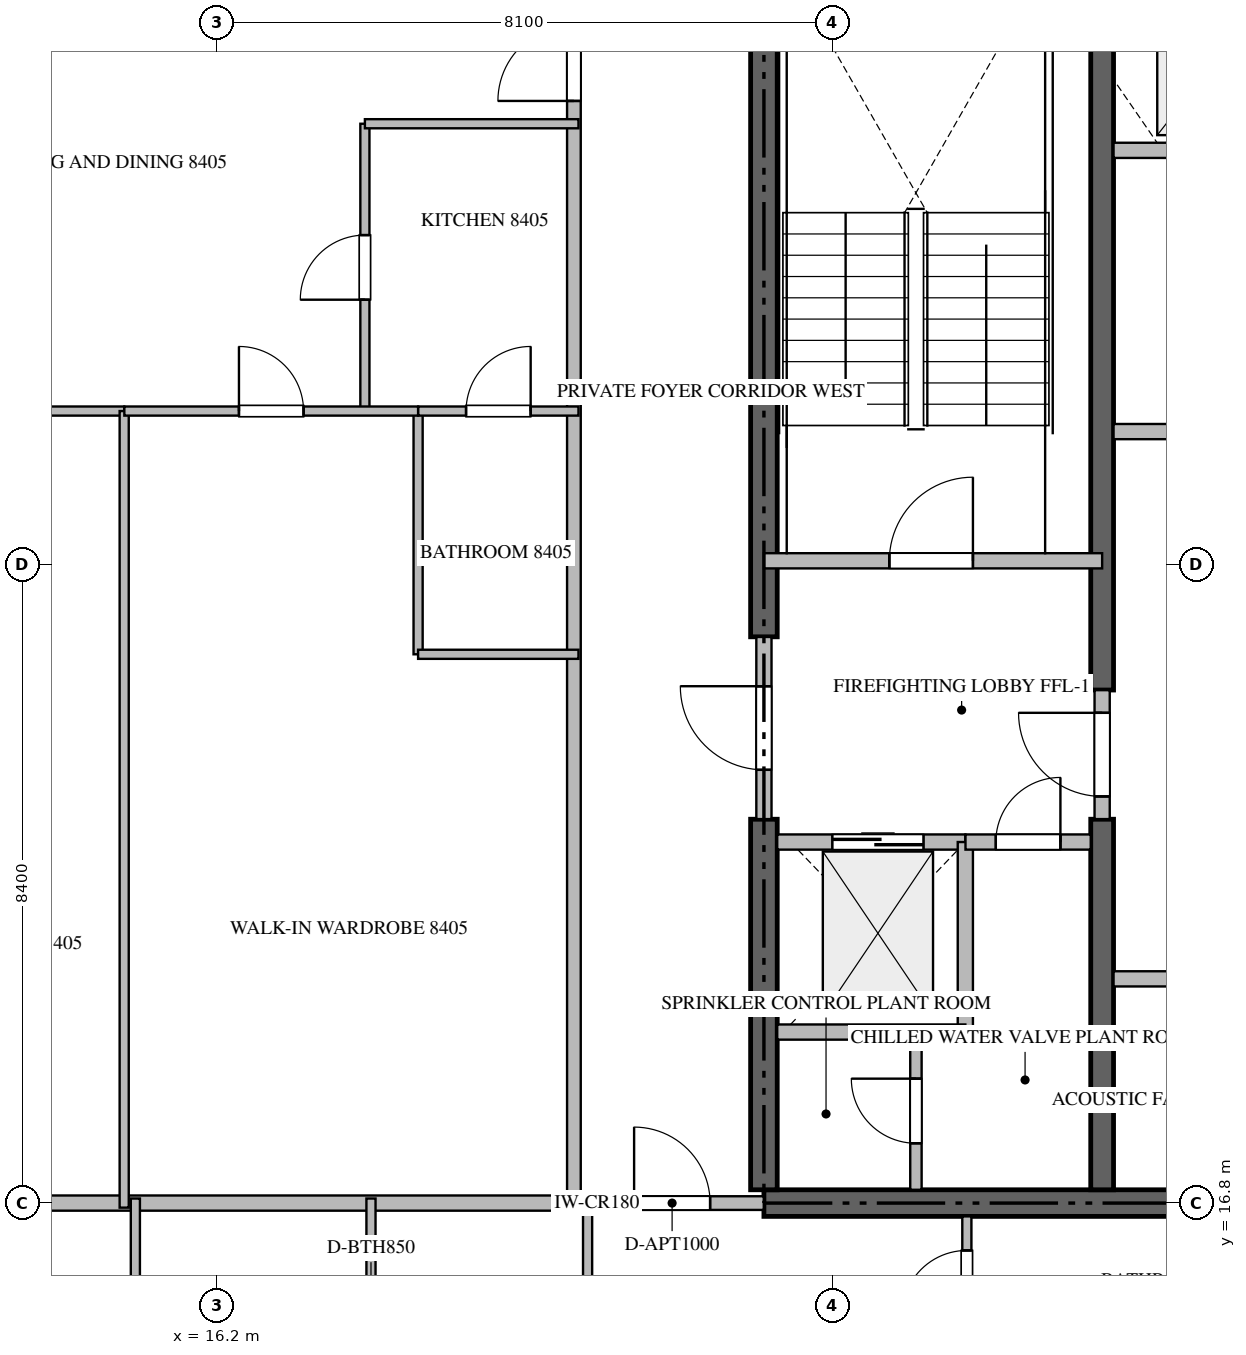
"""IFC4 building model, lengths in metres.
Left out: names, types, materials, properties, quantities, classifications, styles, units other than length and angle.
Written with IfcOpenShell. Run it as: python <this file> out.ifc"""

import sys

from ifc_helpers import new_model, si_unit, direction, frame, frame_2d, origin, place, context, subcontext, project, spatial, rectangle, extrude, source, transform, mapped, element, fill, save


model = new_model("IFC4")
c1 = context("Model", 3, precision=1e-05, world=origin(), true_north=direction((0.0, 1.0)))
c2 = subcontext(c1, "Body", "Model", "MODEL_VIEW")
j1 = project(units=[si_unit("LENGTHUNIT", "METRE"), si_unit("PLANEANGLEUNIT", "RADIAN")], contexts=[c1])
p1 = place(None, origin())
s1 = spatial("IfcSite", under=j1, at=p1, CompositionType="ELEMENT")
p2 = place(p1, origin())
s2 = spatial("IfcBuilding", under=s1, at=p2, CompositionType="ELEMENT")
p3 = place(p2, frame((0.0, 0.0, 338.0)))
s3 = spatial("IfcBuildingStorey", under=s2, at=p3, CompositionType="ELEMENT", Elevation=338.0)
p4 = place(p3, frame((23.4, 16.8, -0.44), z_axis=(0.0, 0.0, 1.0), x_axis=(1.0, 0.0, 0.0)))
e1 = element("IfcWall", 1, at=p4, inside=s3, PredefinedType="SHEAR", context=c2, shape_type="SweptSolid", body=[
    extrude(rectangle(XDim=18.0, YDim=0.35, at=frame_2d((9.0, 0.0))), origin(), (0.0, 0.0, 1.0), 4.228),
])
p5 = place(p3, frame((23.4, 16.975, -0.44), z_axis=(0.0, 0.0, 1.0), x_axis=(0.0, 1.0, 0.0)))
e2 = element("IfcWall", 2, at=p5, inside=s3, PredefinedType="SHEAR", context=c2, shape_type="SweptSolid", body=[
    extrude(rectangle(XDim=4.875, YDim=0.35, at=frame_2d((2.438, 0.0))), origin(), (0.0, 0.0, 1.0), 4.228),
])
p6 = place(p3, frame((23.4, 24.25, -0.44), z_axis=(0.0, 0.0, 1.0), x_axis=(0.0, 1.0, 0.0)))
e3 = element("IfcWall", 3, at=p6, inside=s3, PredefinedType="SHEAR", context=c2, shape_type="SweptSolid", body=[
    extrude(rectangle(XDim=9.175, YDim=0.35, at=frame_2d((4.587, 0.0))), origin(), (0.0, 0.0, 1.0), 4.228),
])
p7 = place(p3, frame((27.85, 16.975, -0.44), z_axis=(0.0, 0.0, 1.0), x_axis=(0.0, 1.0, 0.0)))
e4 = element("IfcWall", 4, at=p7, inside=s3, PredefinedType="SHEAR", context=c2, shape_type="SweptSolid", body=[
    extrude(rectangle(XDim=4.875, YDim=0.3, at=frame_2d((2.438, 0.0))), origin(), (0.0, 0.0, 1.0), 4.228),
])
p8 = place(p3, frame((27.85, 23.55, -0.44), z_axis=(0.0, 0.0, 1.0), x_axis=(0.0, 1.0, 0.0)))
e5 = element("IfcWall", 5, at=p8, inside=s3, PredefinedType="SHEAR", context=c2, shape_type="SweptSolid", body=[
    extrude(rectangle(XDim=9.875, YDim=0.3, at=frame_2d((4.938, 0.0))), origin(), (0.0, 0.0, 1.0), 4.228),
])
p9 = place(p3, frame((23.4, 25.25, 0.0), z_axis=(0.0, 0.0, 1.0), x_axis=(1.0, 0.0, 0.0)))
e6 = element("IfcWall", 6, at=p9, inside=s3, PredefinedType="STANDARD", context=c2, shape_type="SweptSolid", body=[
    extrude(rectangle(XDim=4.45, YDim=0.2, at=frame_2d((2.225, 0.0))), origin(), (0.0, 0.0, 1.0), 3.79),
])
p10 = place(p9, frame((1.65, 0.0, 0.0)))
e7 = element("IfcOpeningElement", 7, at=p10, cuts=e6, PredefinedType="OPENING", context=c2, shape_type="SweptSolid", body=[
    extrude(rectangle(XDim=1.1, YDim=2.15, at=frame_2d((0.55, 1.075))), frame((0.0, 0.11, 0.0), z_axis=(0.0, -1.0, 0.0), x_axis=(1.0, 0.0, 0.0)), (0.0, 0.0, 1.0), 0.22),
])
p11 = place(p3, frame((23.575, 21.55, 0.0), z_axis=(0.0, 0.0, 1.0), x_axis=(1.0, 0.0, 0.0)))
e8 = element("IfcWall", 8, at=p11, inside=s3, PredefinedType="STANDARD", context=c2, shape_type="SweptSolid", body=[
    extrude(rectangle(XDim=2.475, YDim=0.2, at=frame_2d((1.238, 0.0))), origin(), (0.0, 0.0, 1.0), 3.79),
])
p12 = place(p11, frame((0.725, 0.0, 0.0)))
e9 = element("IfcOpeningElement", 9, at=p12, cuts=e8, PredefinedType="OPENING", context=c2, shape_type="SweptSolid", body=[
    extrude(rectangle(XDim=1.2, YDim=2.2, at=frame_2d((0.6, 1.1))), frame((0.0, 0.11, 0.0), z_axis=(0.0, -1.0, 0.0), x_axis=(1.0, 0.0, 0.0)), (0.0, 0.0, 1.0), 0.22),
])
p13 = place(p3, frame((28.0, 30.65, 0.0), z_axis=(0.0, 0.0, 1.0), x_axis=(1.0, 0.0, 0.0)))
e10 = element("IfcWall", 10, at=p13, inside=s3, PredefinedType="STANDARD", context=c2, shape_type="SweptSolid", body=[
    extrude(rectangle(XDim=2.55, YDim=0.2, at=frame_2d((1.275, 0.0))), origin(), (0.0, 0.0, 1.0), 3.79),
])
p14 = place(p13, frame((0.85, 0.0, 0.0)))
e11 = element("IfcOpeningElement", 11, at=p14, cuts=e10, PredefinedType="OPENING", context=c2, shape_type="SweptSolid", body=[
    extrude(rectangle(XDim=1.1, YDim=2.2, at=frame_2d((0.55, 1.1))), frame((0.0, 0.11, 0.0), z_axis=(0.0, -1.0, 0.0), x_axis=(1.0, 0.0, 0.0)), (0.0, 0.0, 1.0), 0.22),
])
p15 = place(p3, frame((26.05, 19.05, 0.0), z_axis=(0.0, 0.0, 1.0), x_axis=(0.0, 1.0, 0.0)))
e12 = element("IfcWall", 12, at=p15, inside=s3, PredefinedType="STANDARD", context=c2, shape_type="SweptSolid", body=[
    extrude(rectangle(XDim=2.5, YDim=0.2, at=frame_2d((1.25, 0.0))), origin(), (0.0, 0.0, 1.0), 3.79),
])
p16 = place(p3, frame((23.575, 19.05, 0.0), z_axis=(0.0, 0.0, 1.0), x_axis=(1.0, 0.0, 0.0)))
e13 = element("IfcWall", 13, at=p16, inside=s3, PredefinedType="STANDARD", context=c2, shape_type="SweptSolid", body=[
    extrude(rectangle(XDim=2.475, YDim=0.2, at=frame_2d((1.238, 0.0))), origin(), (0.0, 0.0, 1.0), 3.79),
])
p17 = place(p3, frame((26.052, 21.55, 0.0), z_axis=(0.0, 0.0, 1.0), x_axis=(1.0, 0.0, 0.0)))
e14 = element("IfcWall", 14, at=p17, inside=s3, PredefinedType="STANDARD", context=c2, shape_type="SweptSolid", body=[
    extrude(rectangle(XDim=1.648, YDim=0.2, at=frame_2d((0.824, 0.0))), origin(), (0.0, 0.0, 1.0), 3.79),
])
p18 = place(p17, frame((0.399, 0.0, 0.0)))
e15 = element("IfcOpeningElement", 15, at=p18, cuts=e14, PredefinedType="OPENING", context=c2, shape_type="SweptSolid", body=[
    extrude(rectangle(XDim=0.85, YDim=2.1, at=frame_2d((0.425, 1.05))), frame((0.0, 0.11, 0.0), z_axis=(0.0, -1.0, 0.0), x_axis=(1.0, 0.0, 0.0)), (0.0, 0.0, 1.0), 0.22),
])
p19 = place(p3, frame((23.4, 21.852, 0.0), z_axis=(0.0, 0.0, 1.0), x_axis=(0.0, 1.0, 0.0)))
e16 = element("IfcWall", 16, at=p19, inside=s3, PredefinedType="STANDARD", context=c2, shape_type="SweptSolid", body=[
    extrude(rectangle(XDim=2.396, YDim=0.2, at=frame_2d((1.198, 0.0))), origin(), (0.0, 0.0, 1.0), 3.79),
])
p20 = place(p19, frame((0.648, 0.0, 0.0)))
e17 = element("IfcOpeningElement", 17, at=p20, cuts=e16, PredefinedType="OPENING", context=c2, shape_type="SweptSolid", body=[
    extrude(rectangle(XDim=1.1, YDim=2.15, at=frame_2d((0.55, 1.075))), frame((0.0, 0.11, 0.0), z_axis=(0.0, -1.0, 0.0), x_axis=(1.0, 0.0, 0.0)), (0.0, 0.0, 1.0), 0.22),
])
p21 = place(p3, frame((27.85, 21.852, 0.0), z_axis=(0.0, 0.0, 1.0), x_axis=(0.0, 1.0, 0.0)))
e18 = element("IfcWall", 18, at=p21, inside=s3, PredefinedType="STANDARD", context=c2, shape_type="SweptSolid", body=[
    extrude(rectangle(XDim=1.696, YDim=0.2, at=frame_2d((0.848, 0.0))), origin(), (0.0, 0.0, 1.0), 3.79),
])
p22 = place(p21, frame((0.298, 0.0, 0.0)))
e19 = element("IfcOpeningElement", 19, at=p22, cuts=e18, PredefinedType="OPENING", context=c2, shape_type="SweptSolid", body=[
    extrude(rectangle(XDim=1.1, YDim=2.15, at=frame_2d((0.55, 1.075))), frame((0.0, 0.11, 0.0), z_axis=(0.0, -1.0, 0.0), x_axis=(1.0, 0.0, 0.0)), (0.0, 0.0, 1.0), 0.22),
])
p23 = place(p3, frame((25.4, 16.975, 0.0), z_axis=(0.0, 0.0, 1.0), x_axis=(0.0, 1.0, 0.0)))
e20 = element("IfcWall", 20, at=p23, inside=s3, PredefinedType="PARTITIONING", context=c2, shape_type="SweptSolid", body=[
    extrude(rectangle(XDim=2.075, YDim=0.15, at=frame_2d((1.038, 0.0))), origin(), (0.0, 0.0, 1.0), 3.79),
])
p24 = place(p23, frame((0.612, 0.0, 0.0)))
e21 = element("IfcOpeningElement", 21, at=p24, cuts=e20, PredefinedType="OPENING", context=c2, shape_type="SweptSolid", body=[
    extrude(rectangle(XDim=0.85, YDim=2.1, at=frame_2d((0.425, 1.05))), frame((0.0, 0.085, 0.0), z_axis=(0.0, -1.0, 0.0), x_axis=(1.0, 0.0, 0.0)), (0.0, 0.0, 1.0), 0.17),
])
p25 = place(p3, frame((28.0, 19.75, 0.0), z_axis=(0.0, 0.0, 1.0), x_axis=(1.0, 0.0, 0.0)))
e22 = element("IfcWall", 22, at=p25, inside=s3, PredefinedType="STANDARD", context=c2, shape_type="SweptSolid", body=[
    extrude(rectangle(XDim=4.4, YDim=0.2, at=frame_2d((2.2, 0.0))), origin(), (0.0, 0.0, 1.0), 3.79),
])
p26 = place(p25, frame((1.75, 0.0, 0.0)))
e23 = element("IfcOpeningElement", 23, at=p26, cuts=e22, PredefinedType="OPENING", context=c2, shape_type="SweptSolid", body=[
    extrude(rectangle(XDim=0.9, YDim=2.1, at=frame_2d((0.45, 1.05))), frame((0.0, 0.11, 0.0), z_axis=(0.0, -1.0, 0.0), x_axis=(1.0, 0.0, 0.0)), (0.0, 0.0, 1.0), 0.22),
])
p27 = place(p3, frame((28.0, 26.95, 0.0), z_axis=(0.0, 0.0, 1.0), x_axis=(1.0, 0.0, 0.0)))
e24 = element("IfcWall", 24, at=p27, inside=s3, PredefinedType="STANDARD", context=c2, shape_type="SweptSolid", body=[
    extrude(rectangle(XDim=6.95, YDim=0.2, at=frame_2d((3.475, 0.0))), origin(), (0.0, 0.0, 1.0), 3.79),
])
p28 = place(p3, frame((10.882, 16.8, 0.0), z_axis=(0.0, 0.0, 1.0), x_axis=(1.0, 0.0, 0.0)))
e25 = element("IfcWall", 25, at=p28, inside=s3, PredefinedType="PARTITIONING", context=c2, shape_type="SweptSolid", body=[
    extrude(rectangle(XDim=10.018, YDim=0.2, at=frame_2d((5.009, 0.0))), origin(), (0.0, 0.0, 1.0), 3.79),
])
p29 = place(p3, frame((20.902, 16.8, 0.0), z_axis=(0.0, 0.0, 1.0), x_axis=(1.0, 0.0, 0.0)))
e26 = element("IfcWall", 26, at=p29, inside=s3, PredefinedType="PARTITIONING", context=c2, shape_type="SweptSolid", body=[
    extrude(rectangle(XDim=2.496, YDim=0.18, at=frame_2d((1.248, 0.0))), origin(), (0.0, 0.0, 1.0), 3.79),
])
p30 = place(p29, frame((0.79, 0.0, 0.0)))
e27 = element("IfcOpeningElement", 27, at=p30, cuts=e26, PredefinedType="OPENING", context=c2, shape_type="SweptSolid", body=[
    extrude(rectangle(XDim=1.0, YDim=2.15, at=frame_2d((0.5, 1.075))), frame((0.0, 0.1, 0.0), z_axis=(0.0, -1.0, 0.0), x_axis=(1.0, 0.0, 0.0)), (0.0, 0.0, 1.0), 0.2),
])
p31 = place(p3, frame((20.9, 16.8, 0.0), z_axis=(0.0, 0.0, 1.0), x_axis=(0.0, 1.0, 0.0)))
e28 = element("IfcWall", 28, at=p31, inside=s3, PredefinedType="PARTITIONING", context=c2, shape_type="SweptSolid", body=[
    extrude(rectangle(XDim=16.8, YDim=0.18, at=frame_2d((8.4, 0.0))), origin(), (0.0, 0.0, 1.0), 3.79),
])
p32 = place(p31, frame((14.5, 0.0, 0.0)))
e29 = element("IfcOpeningElement", 29, at=p32, cuts=e28, PredefinedType="OPENING", context=c2, shape_type="SweptSolid", body=[
    extrude(rectangle(XDim=1.0, YDim=2.15, at=frame_2d((0.5, 1.075))), frame((0.0, 0.1, 0.0), z_axis=(0.0, -1.0, 0.0), x_axis=(1.0, 0.0, 0.0)), (0.0, 0.0, 1.0), 0.2),
])
p33 = place(p3, frame((21.08, 14.05, 0.0), z_axis=(0.0, 0.0, 1.0), x_axis=(0.0, 1.0, 0.0)))
e30 = element("IfcWall", 30, at=p33, inside=s3, PredefinedType="PARTITIONING", context=c2, shape_type="SweptSolid", body=[
    extrude(rectangle(XDim=2.81, YDim=0.12, at=frame_2d((1.405, 0.0))), origin(), (0.0, 0.0, 1.0), 3.79),
])
p34 = place(p3, frame((15.13, 13.944, 0.0), z_axis=(0.0, 0.0, 1.0), x_axis=(0.0, 1.0, 0.0)))
e31 = element("IfcWall", 31, at=p34, inside=s3, PredefinedType="PARTITIONING", context=c2, shape_type="SweptSolid", body=[
    extrude(rectangle(XDim=2.916, YDim=0.12, at=frame_2d((1.458, 0.0))), origin(), (0.0, 0.0, 1.0), 3.79),
])
p35 = place(p3, frame((18.23, 13.946, 0.0), z_axis=(0.0, 0.0, 1.0), x_axis=(0.0, 1.0, 0.0)))
e32 = element("IfcWall", 32, at=p35, inside=s3, PredefinedType="PARTITIONING", context=c2, shape_type="SweptSolid", body=[
    extrude(rectangle(XDim=2.914, YDim=0.12, at=frame_2d((1.457, 0.0))), origin(), (0.0, 0.0, 1.0), 3.79),
])
p36 = place(p35, frame((1.032, 0.0, 0.0)))
e33 = element("IfcOpeningElement", 33, at=p36, cuts=e32, PredefinedType="OPENING", context=c2, shape_type="SweptSolid", body=[
    extrude(rectangle(XDim=0.85, YDim=2.1, at=frame_2d((0.425, 1.05))), frame((0.0, 0.07, 0.0), z_axis=(0.0, -1.0, 0.0), x_axis=(1.0, 0.0, 0.0)), (0.0, 0.0, 1.0), 0.14),
])
p37 = place(p3, frame((26.07, 14.752, 0.0), z_axis=(0.0, 0.0, 1.0), x_axis=(0.0, 1.0, 0.0)))
e34 = element("IfcWall", 34, at=p37, inside=s3, PredefinedType="PARTITIONING", context=c2, shape_type="SweptSolid", body=[
    extrude(rectangle(XDim=1.873, YDim=0.12, at=frame_2d((0.937, 0.0))), origin(), (0.0, 0.0, 1.0), 3.79),
])
p38 = place(p37, frame((0.575, 0.0, 0.0)))
e35 = element("IfcOpeningElement", 35, at=p38, cuts=e34, PredefinedType="OPENING", context=c2, shape_type="SweptSolid", body=[
    extrude(rectangle(XDim=0.85, YDim=2.1, at=frame_2d((0.425, 1.05))), frame((0.0, 0.07, 0.0), z_axis=(0.0, -1.0, 0.0), x_axis=(1.0, 0.0, 0.0)), (0.0, 0.0, 1.0), 0.14),
])
p39 = place(p3, frame((18.15, 27.22, 0.0), z_axis=(0.0, 0.0, 1.0), x_axis=(0.0, 1.0, 0.0)))
e36 = element("IfcWall", 36, at=p39, inside=s3, PredefinedType="PARTITIONING", context=c2, shape_type="SweptSolid", body=[
    extrude(rectangle(XDim=3.78, YDim=0.12, at=frame_2d((1.89, 0.0))), origin(), (0.0, 0.0, 1.0), 3.79),
])
p40 = place(p39, frame((1.465, 0.0, 0.0)))
e37 = element("IfcOpeningElement", 37, at=p40, cuts=e36, PredefinedType="OPENING", context=c2, shape_type="SweptSolid", body=[
    extrude(rectangle(XDim=0.85, YDim=2.1, at=frame_2d((0.425, 1.05))), frame((0.0, 0.07, 0.0), z_axis=(0.0, -1.0, 0.0), x_axis=(1.0, 0.0, 0.0)), (0.0, 0.0, 1.0), 0.14),
])
p41 = place(p3, frame((18.15, 31.0, 0.0), z_axis=(0.0, 0.0, 1.0), x_axis=(1.0, 0.0, 0.0)))
e38 = element("IfcWall", 38, at=p41, inside=s3, PredefinedType="PARTITIONING", context=c2, shape_type="SweptSolid", body=[
    extrude(rectangle(XDim=2.81, YDim=0.12, at=frame_2d((1.405, 0.0))), origin(), (0.0, 0.0, 1.0), 3.79),
])
p42 = place(p3, frame((10.895, 27.22, 0.0), z_axis=(0.0, 0.0, 1.0), x_axis=(1.0, 0.0, 0.0)))
e39 = element("IfcWall", 39, at=p42, inside=s3, PredefinedType="PARTITIONING", context=c2, shape_type="SweptSolid", body=[
    extrude(rectangle(XDim=4.088, YDim=0.12, at=frame_2d((2.044, 0.0))), origin(), (0.0, 0.0, 1.0), 3.79),
])
p43 = place(p42, frame((1.753, 0.0, 0.0)))
e40 = element("IfcOpeningElement", 40, at=p43, cuts=e39, PredefinedType="OPENING", context=c2, shape_type="SweptSolid", body=[
    extrude(rectangle(XDim=0.9, YDim=2.1, at=frame_2d((0.45, 1.05))), frame((0.0, 0.07, 0.0), z_axis=(0.0, -1.0, 0.0), x_axis=(1.0, 0.0, 0.0)), (0.0, 0.0, 1.0), 0.14),
])
p44 = place(p3, frame((14.983, 16.74, 0.0), z_axis=(0.0, 0.0, 1.0), x_axis=(0.0, 1.0, 0.0)))
e41 = element("IfcWall", 41, at=p44, inside=s3, PredefinedType="PARTITIONING", context=c2, shape_type="SweptSolid", body=[
    extrude(rectangle(XDim=10.48, YDim=0.12, at=frame_2d((5.24, 0.0))), origin(), (0.0, 0.0, 1.0), 3.79),
])
p45 = place(p3, frame((18.85, 24.02, 0.0), z_axis=(0.0, 0.0, 1.0), x_axis=(0.0, 1.0, 0.0)))
e42 = element("IfcWall", 42, at=p45, inside=s3, PredefinedType="PARTITIONING", context=c2, shape_type="SweptSolid", body=[
    extrude(rectangle(XDim=3.2, YDim=0.12, at=frame_2d((1.6, 0.0))), origin(), (0.0, 0.0, 1.0), 3.79),
])
p46 = place(p3, frame((18.85, 24.02, 0.0), z_axis=(0.0, 0.0, 1.0), x_axis=(1.0, 0.0, 0.0)))
e43 = element("IfcWall", 43, at=p46, inside=s3, PredefinedType="PARTITIONING", context=c2, shape_type="SweptSolid", body=[
    extrude(rectangle(XDim=2.11, YDim=0.12, at=frame_2d((1.055, 0.0))), origin(), (0.0, 0.0, 1.0), 3.79),
])
p47 = place(p3, frame((14.985, 27.22, 0.0), z_axis=(0.0, 0.0, 1.0), x_axis=(1.0, 0.0, 0.0)))
e44 = element("IfcWall", 44, at=p47, inside=s3, PredefinedType="PARTITIONING", context=c2, shape_type="SweptSolid", body=[
    extrude(rectangle(XDim=3.865, YDim=0.12, at=frame_2d((1.933, 0.0))), origin(), (0.0, 0.0, 1.0), 3.79),
])
p48 = place(p47, frame((1.508, 0.0, 0.0)))
e45 = element("IfcOpeningElement", 45, at=p48, cuts=e44, PredefinedType="OPENING", context=c2, shape_type="SweptSolid", body=[
    extrude(rectangle(XDim=0.85, YDim=2.1, at=frame_2d((0.425, 1.05))), frame((0.0, 0.07, 0.0), z_axis=(0.0, -1.0, 0.0), x_axis=(1.0, 0.0, 0.0)), (0.0, 0.0, 1.0), 0.14),
])
p49 = place(p3, frame((18.852, 27.22, 0.0), z_axis=(0.0, 0.0, 1.0), x_axis=(1.0, 0.0, 0.0)))
e46 = element("IfcWall", 46, at=p49, inside=s3, PredefinedType="PARTITIONING", context=c2, shape_type="SweptSolid", body=[
    extrude(rectangle(XDim=2.108, YDim=0.12, at=frame_2d((1.054, 0.0))), origin(), (0.0, 0.0, 1.0), 3.79),
])
p50 = place(p49, frame((0.629, 0.0, 0.0)))
e47 = element("IfcOpeningElement", 47, at=p50, cuts=e46, PredefinedType="OPENING", context=c2, shape_type="SweptSolid", body=[
    extrude(rectangle(XDim=0.85, YDim=2.1, at=frame_2d((0.425, 1.05))), frame((0.0, 0.07, 0.0), z_axis=(0.0, -1.0, 0.0), x_axis=(1.0, 0.0, 0.0)), (0.0, 0.0, 1.0), 0.14),
])
m1 = source(origin(), c2, "Body", "SweptSolid", [
    extrude(rectangle(XDim=1.1, YDim=2.15, at=frame_2d((0.55, 1.075))), frame((0.0, 0.025, 0.0), z_axis=(0.0, -1.0, 0.0), x_axis=(1.0, 0.0, 0.0)), (0.0, 0.0, 1.0), 0.05),
])
p51 = place(p10, origin())
e48 = element("IfcDoor", 48, at=p51, inside=s3, OperationType="SINGLE_SWING_RIGHT", PredefinedType="DOOR", context=c2, shape_type="MappedRepresentation", body=[
    mapped(m1, transform((0.0, 0.0, 0.0), scale=1.0)),
])
fill(e7, e48)
m2 = source(origin(), c2, "Body", "SweptSolid", [
    extrude(rectangle(XDim=1.2, YDim=2.2, at=frame_2d((0.6, 1.1))), frame((0.0, 0.025, 0.0), z_axis=(0.0, -1.0, 0.0), x_axis=(1.0, 0.0, 0.0)), (0.0, 0.0, 1.0), 0.05),
])
p52 = place(p12, origin())
e49 = element("IfcDoor", 49, at=p52, inside=s3, OperationType="DOUBLE_DOOR_SLIDING", PredefinedType="DOOR", context=c2, shape_type="MappedRepresentation", body=[
    mapped(m2, transform((0.0, 0.0, 0.0), scale=1.0)),
])
fill(e9, e49)
m3 = source(origin(), c2, "Body", "SweptSolid", [
    extrude(rectangle(XDim=0.85, YDim=2.1, at=frame_2d((0.425, 1.05))), frame((0.0, 0.025, 0.0), z_axis=(0.0, -1.0, 0.0), x_axis=(1.0, 0.0, 0.0)), (0.0, 0.0, 1.0), 0.05),
])
p53 = place(p18, origin())
e50 = element("IfcDoor", 50, at=p53, inside=s3, OperationType="SINGLE_SWING_RIGHT", PredefinedType="DOOR", context=c2, shape_type="MappedRepresentation", body=[
    mapped(m3, transform((0.0, 0.0, 0.0), scale=1.0)),
])
fill(e15, e50)
p54 = place(p20, origin())
e51 = element("IfcDoor", 51, at=p54, inside=s3, OperationType="SINGLE_SWING_RIGHT", PredefinedType="DOOR", context=c2, shape_type="MappedRepresentation", body=[
    mapped(m1, transform((0.0, 0.0, 0.0), scale=1.0)),
])
fill(e17, e51)
p55 = place(p22, origin())
e52 = element("IfcDoor", 52, at=p55, inside=s3, OperationType="SINGLE_SWING_RIGHT", PredefinedType="DOOR", context=c2, shape_type="MappedRepresentation", body=[
    mapped(m1, transform((0.0, 0.0, 0.0), scale=1.0)),
])
fill(e19, e52)
p56 = place(p24, origin())
e53 = element("IfcDoor", 53, at=p56, inside=s3, OperationType="SINGLE_SWING_RIGHT", PredefinedType="DOOR", context=c2, shape_type="MappedRepresentation", body=[
    mapped(m3, transform((0.0, 0.0, 0.0), scale=1.0)),
])
fill(e21, e53)
m4 = source(origin(), c2, "Body", "SweptSolid", [
    extrude(rectangle(XDim=1.0, YDim=2.15, at=frame_2d((0.5, 1.075))), frame((0.0, 0.025, 0.0), z_axis=(0.0, -1.0, 0.0), x_axis=(1.0, 0.0, 0.0)), (0.0, 0.0, 1.0), 0.05),
])
p57 = place(p30, origin())
e54 = element("IfcDoor", 54, at=p57, inside=s3, OperationType="SINGLE_SWING_LEFT", PredefinedType="DOOR", context=c2, shape_type="MappedRepresentation", body=[
    mapped(m4, transform((0.0, 0.0, 0.0), scale=1.0)),
])
fill(e27, e54)
p58 = place(p32, origin())
e55 = element("IfcDoor", 55, at=p58, inside=s3, OperationType="SINGLE_SWING_LEFT", PredefinedType="DOOR", context=c2, shape_type="MappedRepresentation", body=[
    mapped(m4, transform((0.0, 0.0, 0.0), scale=1.0)),
])
fill(e29, e55)
p59 = place(p38, origin())
e56 = element("IfcDoor", 56, at=p59, inside=s3, OperationType="SINGLE_SWING_LEFT", PredefinedType="DOOR", context=c2, shape_type="MappedRepresentation", body=[
    mapped(m3, transform((0.0, 0.0, 0.0), scale=1.0)),
])
fill(e35, e56)
p60 = place(p40, origin())
e57 = element("IfcDoor", 57, at=p60, inside=s3, OperationType="SINGLE_SWING_LEFT", PredefinedType="DOOR", context=c2, shape_type="MappedRepresentation", body=[
    mapped(m3, transform((0.0, 0.0, 0.0), scale=1.0)),
])
fill(e37, e57)
p61 = place(p48, origin())
e58 = element("IfcDoor", 58, at=p61, inside=s3, OperationType="SINGLE_SWING_LEFT", PredefinedType="DOOR", context=c2, shape_type="MappedRepresentation", body=[
    mapped(m3, transform((0.0, 0.0, 0.0), scale=1.0)),
])
fill(e45, e58)
p62 = place(p50, origin())
e59 = element("IfcDoor", 59, at=p62, inside=s3, OperationType="SINGLE_SWING_RIGHT", PredefinedType="DOOR", context=c2, shape_type="MappedRepresentation", body=[
    mapped(m3, transform((0.0, 0.0, 0.0), scale=1.0)),
])
fill(e47, e59)
save(model, sys.argv[1])
